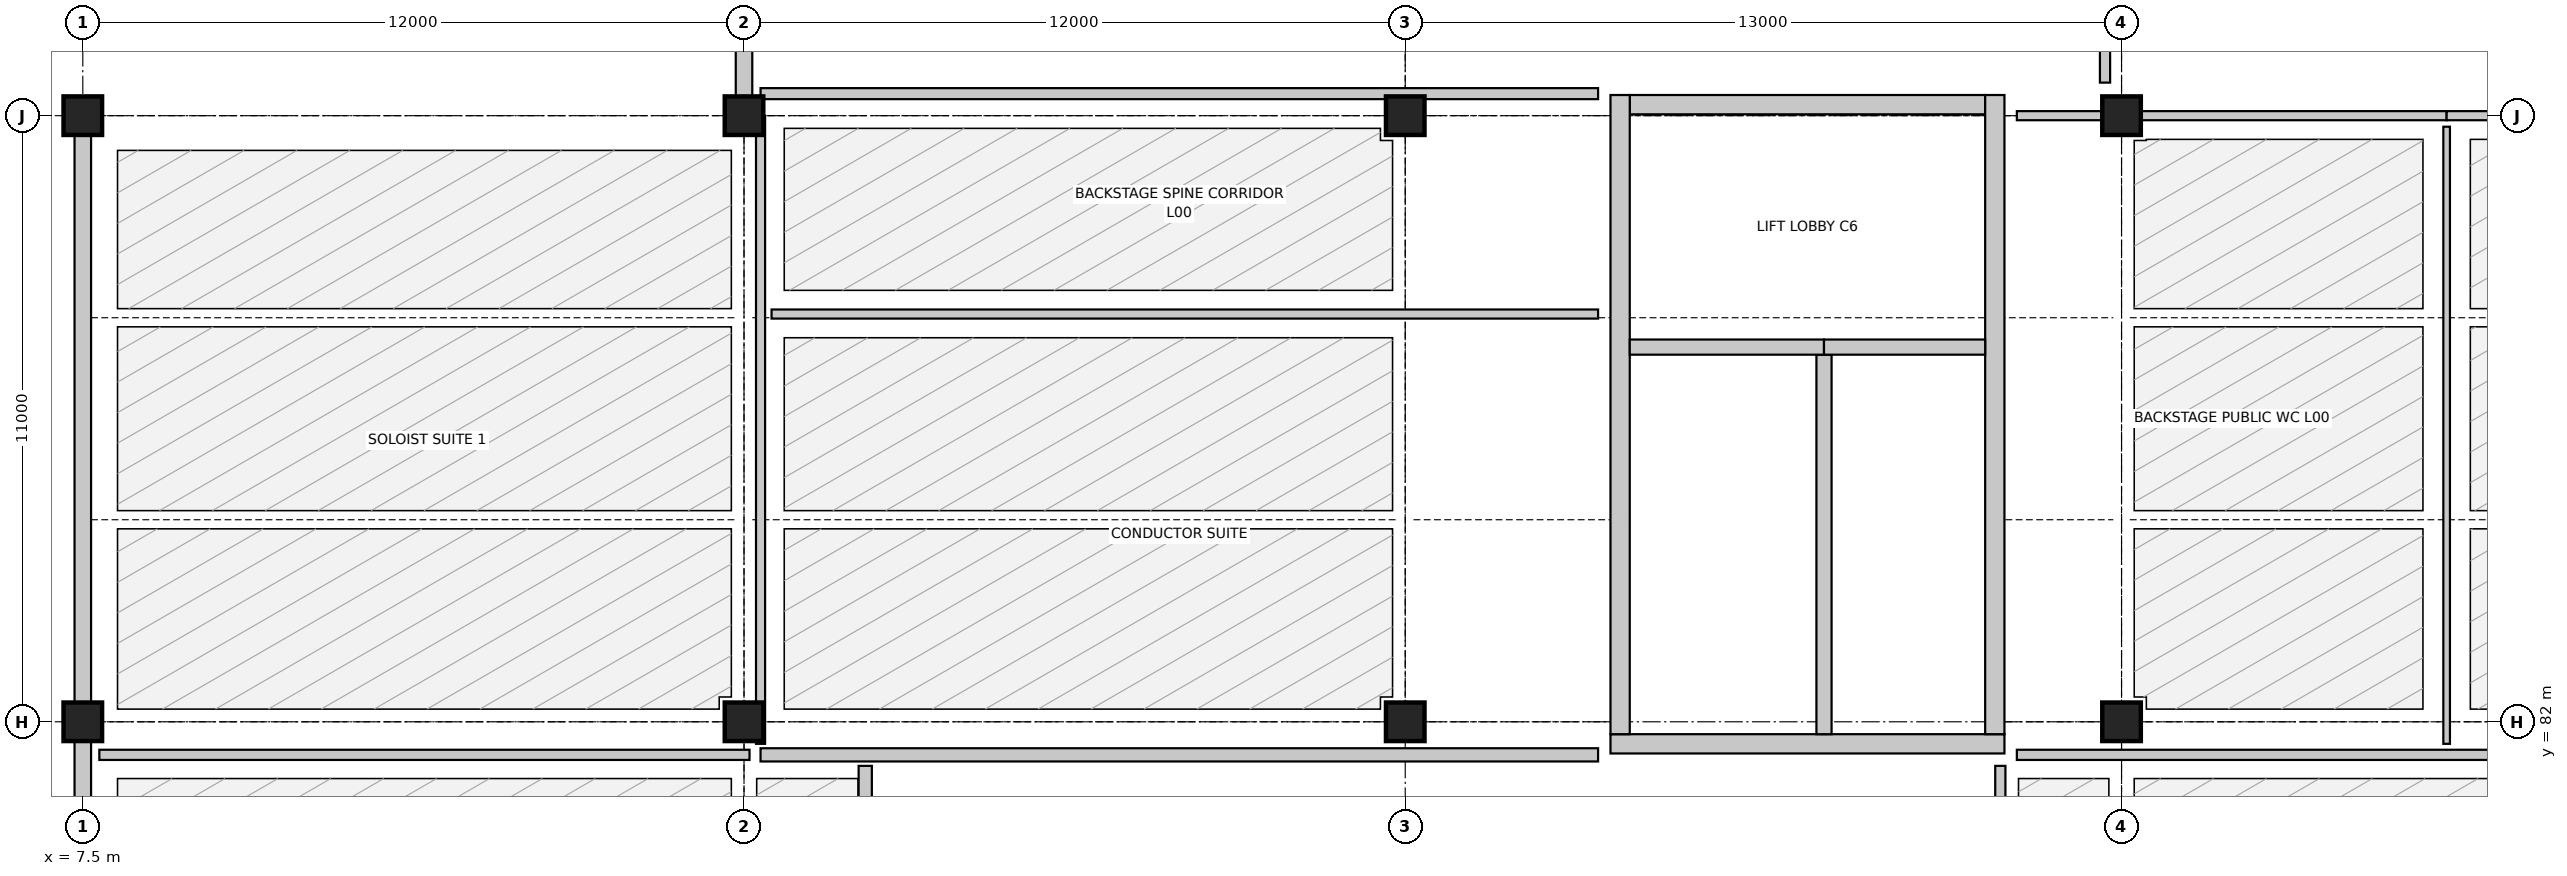
"""IFC4 building model, lengths in metres.
Left out: names, types, materials, properties, quantities, classifications, styles, units other than length and angle.
Written with IfcOpenShell. Run it as: python <this file> out.ifc"""

import sys

from ifc_helpers import new_model, si_unit, direction, frame, frame_2d, origin, origin_2d, place, context, subcontext, project, spatial, rectangle, extrude, element, fill, save


model = new_model("IFC4")
c1 = context("Model", 3, precision=1e-05, world=origin(), true_north=direction((0.0, 1.0)))
c2 = subcontext(c1, "Body", "Model", "MODEL_VIEW")
j1 = project(units=[si_unit("LENGTHUNIT", "METRE"), si_unit("PLANEANGLEUNIT", "RADIAN")], contexts=[c1])
p1 = place(None, origin())
s1 = spatial("IfcSite", under=j1, at=p1, CompositionType="ELEMENT")
p2 = place(p1, origin())
s2 = spatial("IfcBuilding", under=s1, at=p2, CompositionType="ELEMENT")
p3 = place(p2, origin())
s3 = spatial("IfcBuildingStorey", under=s2, at=p3, CompositionType="ELEMENT", Elevation=0.0)
for number, where, z_axis, x_axis in (
    (1, (7.5, 82.0, 0.0), (0.0, 0.0, 1.0), (1.0, 0.0, 0.0)),
    (2, (7.5, 93.0, 0.0), (0.0, 0.0, 1.0), (1.0, 0.0, 0.0)),
    (3, (19.5, 82.0, 0.0), (0.0, 0.0, 1.0), (1.0, 0.0, 0.0)),
    (4, (19.5, 93.0, 0.0), (0.0, 0.0, 1.0), (1.0, 0.0, 0.0)),
    (5, (31.5, 82.0, 0.0), (0.0, 0.0, 1.0), (1.0, 0.0, 0.0)),
    (6, (31.5, 93.0, 0.0), (0.0, 0.0, 1.0), (1.0, 0.0, 0.0)),
    (7, (44.5, 82.0, 0.0), (0.0, 0.0, 1.0), (1.0, 0.0, 0.0)),
    (8, (44.5, 93.0, 0.0), (0.0, 0.0, 1.0), (1.0, 0.0, 0.0)),
):
    element("IfcColumn", number, at=place(p3, frame(where, z_axis=z_axis, x_axis=x_axis)), inside=s3, PredefinedType="COLUMN", context=c2, shape_type="SweptSolid", body=[
        extrude(rectangle(XDim=0.7, YDim=0.7, at=origin_2d()), origin(), (0.0, 0.0, 1.0), 4.8),
    ])
p4 = place(p3, frame((19.5, 93.02, 0.0), z_axis=(0.0, 0.0, 1.0), x_axis=(0.0, 1.0, 0.0)))
e9 = element("IfcWall", 9, at=p4, inside=s3, PredefinedType="SOLIDWALL", context=c2, shape_type="SweptSolid", body=[
    extrude(rectangle(XDim=10.96, YDim=0.3, at=frame_2d((5.48, 0.0))), origin(), (0.0, 0.0, 1.0), 3.958),
])
p5 = place(p4, frame((4.905, 0.0, 0.0)))
e10 = element("IfcOpeningElement", 10, at=p5, cuts=e9, PredefinedType="OPENING", context=c2, shape_type="SweptSolid", body=[
    extrude(rectangle(XDim=1.15, YDim=2.12, at=frame_2d((0.575, 1.06))), frame((0.0, 0.16, 0.0), z_axis=(0.0, -1.0, 0.0), x_axis=(1.0, 0.0, 0.0)), (0.0, 0.0, 1.0), 0.32),
])
p6 = place(p3, frame((7.5, 82.02, 0.0), z_axis=(0.0, 0.0, 1.0), x_axis=(0.0, 1.0, 0.0)))
e11 = element("IfcWall", 11, at=p6, inside=s3, PredefinedType="SOLIDWALL", context=c2, shape_type="SweptSolid", body=[
    extrude(rectangle(XDim=10.96, YDim=0.3, at=frame_2d((5.48, 0.0))), origin(), (0.0, 0.0, 1.0), 3.958),
])
p7 = place(p6, frame((4.655, 0.0, 0.9)))
e12 = element("IfcOpeningElement", 12, at=p7, cuts=e11, PredefinedType="OPENING", context=c2, shape_type="SweptSolid", body=[
    extrude(rectangle(XDim=1.65, YDim=1.55, at=frame_2d((0.825, 0.775))), frame((0.0, 0.16, 0.0), z_axis=(0.0, -1.0, 0.0), x_axis=(1.0, 0.0, 0.0)), (0.0, 0.0, 1.0), 0.32),
])
p8 = place(p3, frame((7.5, 71.02, 0.0), z_axis=(0.0, 0.0, 1.0), x_axis=(0.0, 1.0, 0.0)))
e13 = element("IfcWall", 13, at=p8, inside=s3, PredefinedType="SOLIDWALL", context=c2, shape_type="SweptSolid", body=[
    extrude(rectangle(XDim=10.96, YDim=0.3, at=frame_2d((5.48, 0.0))), origin(), (0.0, 0.0, 1.0), 3.958),
])
p9 = place(p8, frame((4.53, 0.0, 0.0)))
e14 = element("IfcOpeningElement", 14, at=p9, cuts=e13, PredefinedType="OPENING", context=c2, shape_type="SweptSolid", body=[
    extrude(rectangle(XDim=1.9, YDim=2.3, at=frame_2d((0.95, 1.15))), frame((0.0, 0.16, 0.0), z_axis=(0.0, -1.0, 0.0), x_axis=(1.0, 0.0, 0.0)), (0.0, 0.0, 1.0), 0.32),
])
p10 = place(p3, frame((35.225, 81.6, 0.0), z_axis=(0.0, 0.0, 1.0), x_axis=(1.0, 0.0, 0.0)))
e15 = element("IfcWall", 15, at=p10, inside=s3, PredefinedType="SHEAR", context=c2, shape_type="SweptSolid", body=[
    extrude(rectangle(XDim=7.15, YDim=0.35, at=frame_2d((3.575, 0.0))), origin(), (0.0, 0.0, 1.0), 4.52),
])
p11 = place(p3, frame((35.575, 93.2, 0.0), z_axis=(0.0, 0.0, 1.0), x_axis=(1.0, 0.0, 0.0)))
e16 = element("IfcWall", 16, at=p11, inside=s3, PredefinedType="SHEAR", context=c2, shape_type="SweptSolid", body=[
    extrude(rectangle(XDim=6.45, YDim=0.35, at=frame_2d((3.225, 0.0))), origin(), (0.0, 0.0, 1.0), 4.52),
])
p12 = place(p11, frame((2.5, 0.0, 0.0)))
e17 = element("IfcOpeningElement", 17, at=p12, cuts=e16, PredefinedType="OPENING", context=c2, shape_type="SweptSolid", body=[
    extrude(rectangle(XDim=1.45, YDim=2.2, at=frame_2d((0.725, 1.1))), frame((0.0, 0.185, 0.0), z_axis=(0.0, -1.0, 0.0), x_axis=(1.0, 0.0, 0.0)), (0.0, 0.0, 1.0), 0.37),
])
for number, where, z_axis, x_axis in (
    (18, (35.4, 81.775, 0.0), (0.0, 0.0, 1.0), (0.0, 1.0, 0.0)),
    (19, (42.2, 81.775, 0.0), (0.0, 0.0, 1.0), (0.0, 1.0, 0.0)),
):
    element("IfcWall", number, at=place(p3, frame(where, z_axis=z_axis, x_axis=x_axis)), inside=s3, PredefinedType="SHEAR", context=c2, shape_type="SweptSolid", body=[
        extrude(rectangle(XDim=11.6, YDim=0.35, at=frame_2d((5.8, 0.0))), origin(), (0.0, 0.0, 1.0), 4.52),
    ])
p13 = place(p3, frame((39.1, 81.775, 0.0), z_axis=(0.0, 0.0, 1.0), x_axis=(0.0, 1.0, 0.0)))
e20 = element("IfcWall", 20, at=p13, inside=s3, PredefinedType="SHEAR", context=c2, shape_type="SweptSolid", body=[
    extrude(rectangle(XDim=6.888, YDim=0.275, at=frame_2d((3.444, 0.0))), origin(), (0.0, 0.0, 1.0), 4.52),
])
p14 = place(p3, frame((35.575, 88.8, 0.0), z_axis=(0.0, 0.0, 1.0), x_axis=(1.0, 0.0, 0.0)))
e21 = element("IfcWall", 21, at=p14, inside=s3, PredefinedType="SHEAR", context=c2, shape_type="SweptSolid", body=[
    extrude(rectangle(XDim=3.525, YDim=0.275, at=frame_2d((1.763, 0.0))), origin(), (0.0, 0.0, 1.0), 4.52),
])
p15 = place(p14, frame((1.785, 0.0, 0.0)))
e22 = element("IfcOpeningElement", 22, at=p15, cuts=e21, PredefinedType="OPENING", context=c2, shape_type="SweptSolid", body=[
    extrude(rectangle(XDim=1.25, YDim=2.15, at=frame_2d((0.625, 1.075))), frame((0.0, 0.147, 0.0), z_axis=(0.0, -1.0, 0.0), x_axis=(1.0, 0.0, 0.0)), (0.0, 0.0, 1.0), 0.295),
])
p16 = place(p3, frame((39.1, 88.8, 0.0), z_axis=(0.0, 0.0, 1.0), x_axis=(1.0, 0.0, 0.0)))
e23 = element("IfcWall", 23, at=p16, inside=s3, PredefinedType="SHEAR", context=c2, shape_type="SweptSolid", body=[
    extrude(rectangle(XDim=2.925, YDim=0.275, at=frame_2d((1.462, 0.0))), origin(), (0.0, 0.0, 1.0), 4.52),
])
p17 = place(p16, frame((0.833, 0.0, 0.0)))
e24 = element("IfcOpeningElement", 24, at=p17, cuts=e23, PredefinedType="OPENING", context=c2, shape_type="SweptSolid", body=[
    extrude(rectangle(XDim=1.4, YDim=2.2, at=frame_2d((0.7, 1.1))), frame((0.0, 0.147, 0.0), z_axis=(0.0, -1.0, 0.0), x_axis=(1.0, 0.0, 0.0)), (0.0, 0.0, 1.0), 0.295),
])
p18 = place(p3, frame((19.8, 81.4, 0.0), z_axis=(0.0, 0.0, 1.0), x_axis=(1.0, 0.0, 0.0)))
e25 = element("IfcWall", 25, at=p18, inside=s3, PredefinedType="PARTITIONING", context=c2, shape_type="SweptSolid", body=[
    extrude(rectangle(XDim=15.2, YDim=0.24, at=frame_2d((7.6, 0.0))), origin(), (0.0, 0.0, 1.0), 3.96),
])
p19 = place(p18, frame((6.725, 0.0, 0.0)))
e26 = element("IfcOpeningElement", 26, at=p19, cuts=e25, PredefinedType="OPENING", context=c2, shape_type="SweptSolid", body=[
    extrude(rectangle(XDim=1.75, YDim=2.25, at=frame_2d((0.875, 1.125))), frame((0.0, 0.13, 0.0), z_axis=(0.0, -1.0, 0.0), x_axis=(1.0, 0.0, 0.0)), (0.0, 0.0, 1.0), 0.26),
])
p20 = place(p3, frame((7.8, 81.4, 0.0), z_axis=(0.0, 0.0, 1.0), x_axis=(1.0, 0.0, 0.0)))
e27 = element("IfcWall", 27, at=p20, inside=s3, PredefinedType="PARTITIONING", context=c2, shape_type="SweptSolid", body=[
    extrude(rectangle(XDim=11.8, YDim=0.185, at=frame_2d((5.9, 0.0))), origin(), (0.0, 0.0, 1.0), 3.96),
])
p21 = place(p20, frame((5.375, 0.0, 0.0)))
e28 = element("IfcOpeningElement", 28, at=p21, cuts=e27, PredefinedType="OPENING", context=c2, shape_type="SweptSolid", body=[
    extrude(rectangle(XDim=1.05, YDim=2.15, at=frame_2d((0.525, 1.075))), frame((0.0, 0.103, 0.0), z_axis=(0.0, -1.0, 0.0), x_axis=(1.0, 0.0, 0.0)), (0.0, 0.0, 1.0), 0.205),
])
p22 = place(p3, frame((19.8, 81.6, 0.0), z_axis=(0.0, 0.0, 1.0), x_axis=(0.0, 1.0, 0.0)))
e29 = element("IfcWall", 29, at=p22, inside=s3, PredefinedType="PARTITIONING", context=c2, shape_type="SweptSolid", body=[
    extrude(rectangle(XDim=11.4, YDim=0.165, at=frame_2d((5.7, 0.0))), origin(), (0.0, 0.0, 1.0), 3.96),
])
p23 = place(p22, frame((8.257, 0.0, 0.0)))
e30 = element("IfcOpeningElement", 30, at=p23, cuts=e29, PredefinedType="OPENING", context=c2, shape_type="SweptSolid", body=[
    extrude(rectangle(XDim=1.05, YDim=2.15, at=frame_2d((0.525, 1.075))), frame((0.0, 0.093, 0.0), z_axis=(0.0, -1.0, 0.0), x_axis=(1.0, 0.0, 0.0)), (0.0, 0.0, 1.0), 0.185),
])
p24 = place(p3, frame((20.0, 89.4, 0.0), z_axis=(0.0, 0.0, 1.0), x_axis=(1.0, 0.0, 0.0)))
e31 = element("IfcWall", 31, at=p24, inside=s3, PredefinedType="PARTITIONING", context=c2, shape_type="SweptSolid", body=[
    extrude(rectangle(XDim=15.0, YDim=0.165, at=frame_2d((7.5, 0.0))), origin(), (0.0, 0.0, 1.0), 3.96),
])
p25 = place(p24, frame((6.975, 0.0, 0.0)))
e32 = element("IfcOpeningElement", 32, at=p25, cuts=e31, PredefinedType="OPENING", context=c2, shape_type="SweptSolid", body=[
    extrude(rectangle(XDim=1.05, YDim=2.15, at=frame_2d((0.525, 1.075))), frame((0.0, 0.093, 0.0), z_axis=(0.0, -1.0, 0.0), x_axis=(1.0, 0.0, 0.0)), (0.0, 0.0, 1.0), 0.185),
])
p26 = place(p3, frame((21.7, 60.3, 0.0), z_axis=(0.0, 0.0, 1.0), x_axis=(0.0, 1.0, 0.0)))
e33 = element("IfcWall", 33, at=p26, inside=s3, PredefinedType="PARTITIONING", context=c2, shape_type="SweptSolid", body=[
    extrude(rectangle(XDim=20.9, YDim=0.24, at=frame_2d((10.45, 0.0))), origin(), (0.0, 0.0, 1.0), 3.96),
])
p27 = place(p26, frame((9.625, 0.0, 0.0)))
e34 = element("IfcOpeningElement", 34, at=p27, cuts=e33, PredefinedType="OPENING", context=c2, shape_type="SweptSolid", body=[
    extrude(rectangle(XDim=1.65, YDim=2.2, at=frame_2d((0.825, 1.1))), frame((0.0, 0.13, 0.0), z_axis=(0.0, -1.0, 0.0), x_axis=(1.0, 0.0, 0.0)), (0.0, 0.0, 1.0), 0.26),
])
p28 = place(p3, frame((42.3, 70.7, 0.0), z_axis=(0.0, 0.0, 1.0), x_axis=(0.0, 1.0, 0.0)))
e35 = element("IfcWall", 35, at=p28, inside=s3, PredefinedType="PARTITIONING", context=c2, shape_type="SweptSolid", body=[
    extrude(rectangle(XDim=10.5, YDim=0.185, at=frame_2d((5.25, 0.0))), origin(), (0.0, 0.0, 1.0), 4.514),
])
p29 = place(p28, frame((4.725, 0.0, 0.0)))
e36 = element("IfcOpeningElement", 36, at=p29, cuts=e35, PredefinedType="OPENING", context=c2, shape_type="SweptSolid", body=[
    extrude(rectangle(XDim=1.05, YDim=2.15, at=frame_2d((0.525, 1.075))), frame((0.0, 0.103, 0.0), z_axis=(0.0, -1.0, 0.0), x_axis=(1.0, 0.0, 0.0)), (0.0, 0.0, 1.0), 0.205),
])
p30 = place(p3, frame((42.6, 93.0, 0.0), z_axis=(0.0, 0.0, 1.0), x_axis=(1.0, 0.0, 0.0)))
e37 = element("IfcWall", 37, at=p30, inside=s3, PredefinedType="PARTITIONING", context=c2, shape_type="SweptSolid", body=[
    extrude(rectangle(XDim=7.8, YDim=0.165, at=frame_2d((3.9, 0.0))), origin(), (0.0, 0.0, 1.0), 3.96),
])
p31 = place(p30, frame((3.44, 0.0, 0.0)))
e38 = element("IfcOpeningElement", 38, at=p31, cuts=e37, PredefinedType="OPENING", context=c2, shape_type="SweptSolid", body=[
    extrude(rectangle(XDim=0.92, YDim=2.1, at=frame_2d((0.46, 1.05))), frame((0.0, 0.093, 0.0), z_axis=(0.0, -1.0, 0.0), x_axis=(1.0, 0.0, 0.0)), (0.0, 0.0, 1.0), 0.185),
])
p32 = place(p3, frame((50.4, 93.0, 0.0), z_axis=(0.0, 0.0, 1.0), x_axis=(1.0, 0.0, 0.0)))
e39 = element("IfcWall", 39, at=p32, inside=s3, PredefinedType="PARTITIONING", context=c2, shape_type="SweptSolid", body=[
    extrude(rectangle(XDim=6.8, YDim=0.165, at=frame_2d((3.4, 0.0))), origin(), (0.0, 0.0, 1.0), 3.96),
])
p33 = place(p32, frame((2.96, 0.0, 0.0)))
e40 = element("IfcOpeningElement", 40, at=p33, cuts=e39, PredefinedType="OPENING", context=c2, shape_type="SweptSolid", body=[
    extrude(rectangle(XDim=0.88, YDim=2.1, at=frame_2d((0.44, 1.05))), frame((0.0, 0.093, 0.0), z_axis=(0.0, -1.0, 0.0), x_axis=(1.0, 0.0, 0.0)), (0.0, 0.0, 1.0), 0.185),
])
p34 = place(p3, frame((50.4, 81.6, 0.0), z_axis=(0.0, 0.0, 1.0), x_axis=(0.0, 1.0, 0.0)))
e41 = element("IfcWall", 41, at=p34, inside=s3, PredefinedType="PARTITIONING", context=c2, shape_type="SweptSolid", body=[
    extrude(rectangle(XDim=11.2, YDim=0.12, at=frame_2d((5.6, 0.0))), origin(), (0.0, 0.0, 1.0), 3.96),
])
p35 = place(p3, frame((42.6, 81.4, 0.0), z_axis=(0.0, 0.0, 1.0), x_axis=(1.0, 0.0, 0.0)))
e42 = element("IfcWall", 42, at=p35, inside=s3, PredefinedType="PARTITIONING", context=c2, shape_type="SweptSolid", body=[
    extrude(rectangle(XDim=14.6, YDim=0.185, at=frame_2d((7.3, 0.0))), origin(), (0.0, 0.0, 1.0), 3.96),
])
p36 = place(p35, frame((4.851, 0.0, 0.0)))
e43 = element("IfcOpeningElement", 43, at=p36, cuts=e42, PredefinedType="OPENING", context=c2, shape_type="SweptSolid", body=[
    extrude(rectangle(XDim=1.05, YDim=2.15, at=frame_2d((0.525, 1.075))), frame((0.0, 0.103, 0.0), z_axis=(0.0, -1.0, 0.0), x_axis=(1.0, 0.0, 0.0)), (0.0, 0.0, 1.0), 0.205),
])
p37 = place(p3, frame((44.2, 93.6, 0.0), z_axis=(0.0, 0.0, 1.0), x_axis=(0.0, 1.0, 0.0)))
e44 = element("IfcWall", 44, at=p37, inside=s3, PredefinedType="PARTITIONING", context=c2, shape_type="SweptSolid", body=[
    extrude(rectangle(XDim=21.3, YDim=0.185, at=frame_2d((10.65, 0.0))), origin(), (0.0, 0.0, 1.0), 3.96),
])
p38 = place(p37, frame((5.23, 0.0, 0.0)))
e45 = element("IfcOpeningElement", 45, at=p38, cuts=e44, PredefinedType="OPENING", context=c2, shape_type="SweptSolid", body=[
    extrude(rectangle(XDim=1.1, YDim=2.15, at=frame_2d((0.55, 1.075))), frame((0.0, 0.103, 0.0), z_axis=(0.0, -1.0, 0.0), x_axis=(1.0, 0.0, 0.0)), (0.0, 0.0, 1.0), 0.205),
])
p39 = place(p3, frame((19.8, 93.4, 0.0), z_axis=(0.0, 0.0, 1.0), x_axis=(1.0, 0.0, 0.0)))
e46 = element("IfcWall", 46, at=p39, inside=s3, PredefinedType="PARTITIONING", context=c2, shape_type="SweptSolid", body=[
    extrude(rectangle(XDim=15.2, YDim=0.2, at=frame_2d((7.6, 0.0))), origin(), (0.0, 0.0, 1.0), 3.96),
])
p40 = place(p39, frame((6.825, 0.0, 0.0)))
e47 = element("IfcOpeningElement", 47, at=p40, cuts=e46, PredefinedType="OPENING", context=c2, shape_type="SweptSolid", body=[
    extrude(rectangle(XDim=1.55, YDim=2.18, at=frame_2d((0.775, 1.09))), frame((0.0, 0.11, 0.0), z_axis=(0.0, -1.0, 0.0), x_axis=(1.0, 0.0, 0.0)), (0.0, 0.0, 1.0), 0.22),
])
p41 = place(p7, origin())
e48 = element("IfcWindow", 48, at=p41, inside=s3, PartitioningType="SINGLE_PANEL", PredefinedType="WINDOW", context=c2, shape_type="SweptSolid", body=[
    extrude(rectangle(XDim=1.65, YDim=1.55, at=frame_2d((0.825, 0.775))), frame((0.0, 0.03, 0.0), z_axis=(0.0, -1.0, 0.0), x_axis=(1.0, 0.0, 0.0)), (0.0, 0.0, 1.0), 0.06),
])
fill(e12, e48)
p42 = place(p15, origin())
e49 = element("IfcDoor", 49, at=p42, inside=s3, OperationType="SINGLE_SWING_RIGHT", PredefinedType="DOOR", context=c2, shape_type="SweptSolid", body=[
    extrude(rectangle(XDim=1.25, YDim=2.15, at=frame_2d((0.625, 1.075))), frame((0.0, 0.025, 0.0), z_axis=(0.0, -1.0, 0.0), x_axis=(1.0, 0.0, 0.0)), (0.0, 0.0, 1.0), 0.05),
])
fill(e22, e49)
p43 = place(p17, origin())
e50 = element("IfcDoor", 50, at=p43, inside=s3, OperationType="DOUBLE_DOOR_SLIDING", PredefinedType="DOOR", context=c2, shape_type="SweptSolid", body=[
    extrude(rectangle(XDim=1.4, YDim=2.2, at=frame_2d((0.7, 1.1))), frame((0.0, 0.025, 0.0), z_axis=(0.0, -1.0, 0.0), x_axis=(1.0, 0.0, 0.0)), (0.0, 0.0, 1.0), 0.05),
])
fill(e24, e50)
p44 = place(p12, origin())
e51 = element("IfcDoor", 51, at=p44, inside=s3, OperationType="SINGLE_SWING_LEFT", PredefinedType="DOOR", context=c2, shape_type="SweptSolid", body=[
    extrude(rectangle(XDim=1.45, YDim=2.2, at=frame_2d((0.725, 1.1))), frame((0.0, 0.025, 0.0), z_axis=(0.0, -1.0, 0.0), x_axis=(1.0, 0.0, 0.0)), (0.0, 0.0, 1.0), 0.05),
])
fill(e17, e51)
p45 = place(p19, origin())
e52 = element("IfcDoor", 52, at=p45, inside=s3, OperationType="SINGLE_SWING_RIGHT", PredefinedType="DOOR", context=c2, shape_type="SweptSolid", body=[
    extrude(rectangle(XDim=1.75, YDim=2.25, at=frame_2d((0.875, 1.125))), frame((0.0, 0.025, 0.0), z_axis=(0.0, -1.0, 0.0), x_axis=(1.0, 0.0, 0.0)), (0.0, 0.0, 1.0), 0.05),
])
fill(e26, e52)
p46 = place(p21, origin())
e53 = element("IfcDoor", 53, at=p46, inside=s3, OperationType="SINGLE_SWING_LEFT", PredefinedType="DOOR", context=c2, shape_type="SweptSolid", body=[
    extrude(rectangle(XDim=1.05, YDim=2.15, at=frame_2d((0.525, 1.075))), frame((0.0, 0.025, 0.0), z_axis=(0.0, -1.0, 0.0), x_axis=(1.0, 0.0, 0.0)), (0.0, 0.0, 1.0), 0.05),
])
fill(e28, e53)
p47 = place(p23, origin())
e54 = element("IfcDoor", 54, at=p47, inside=s3, OperationType="SINGLE_SWING_RIGHT", PredefinedType="DOOR", context=c2, shape_type="SweptSolid", body=[
    extrude(rectangle(XDim=1.05, YDim=2.15, at=frame_2d((0.525, 1.075))), frame((0.0, 0.025, 0.0), z_axis=(0.0, -1.0, 0.0), x_axis=(1.0, 0.0, 0.0)), (0.0, 0.0, 1.0), 0.05),
])
fill(e30, e54)
p48 = place(p25, origin())
e55 = element("IfcDoor", 55, at=p48, inside=s3, OperationType="SINGLE_SWING_LEFT", PredefinedType="DOOR", context=c2, shape_type="SweptSolid", body=[
    extrude(rectangle(XDim=1.05, YDim=2.15, at=frame_2d((0.525, 1.075))), frame((0.0, 0.025, 0.0), z_axis=(0.0, -1.0, 0.0), x_axis=(1.0, 0.0, 0.0)), (0.0, 0.0, 1.0), 0.05),
])
fill(e32, e55)
p49 = place(p31, origin())
e56 = element("IfcDoor", 56, at=p49, inside=s3, OperationType="SINGLE_SWING_RIGHT", PredefinedType="DOOR", context=c2, shape_type="SweptSolid", body=[
    extrude(rectangle(XDim=0.92, YDim=2.1, at=frame_2d((0.46, 1.05))), frame((0.0, 0.025, 0.0), z_axis=(0.0, -1.0, 0.0), x_axis=(1.0, 0.0, 0.0)), (0.0, 0.0, 1.0), 0.05),
])
fill(e38, e56)
p50 = place(p36, origin())
e57 = element("IfcDoor", 57, at=p50, inside=s3, OperationType="SINGLE_SWING_RIGHT", PredefinedType="DOOR", context=c2, shape_type="SweptSolid", body=[
    extrude(rectangle(XDim=1.05, YDim=2.15, at=frame_2d((0.525, 1.075))), frame((0.0, 0.025, 0.0), z_axis=(0.0, -1.0, 0.0), x_axis=(1.0, 0.0, 0.0)), (0.0, 0.0, 1.0), 0.05),
])
fill(e43, e57)
p51 = place(p40, origin())
e58 = element("IfcDoor", 58, at=p51, inside=s3, OperationType="SINGLE_SWING_RIGHT", PredefinedType="DOOR", context=c2, shape_type="SweptSolid", body=[
    extrude(rectangle(XDim=1.55, YDim=2.18, at=frame_2d((0.775, 1.09))), frame((0.0, 0.025, 0.0), z_axis=(0.0, -1.0, 0.0), x_axis=(1.0, 0.0, 0.0)), (0.0, 0.0, 1.0), 0.05),
])
fill(e47, e58)
save(model, sys.argv[1])
